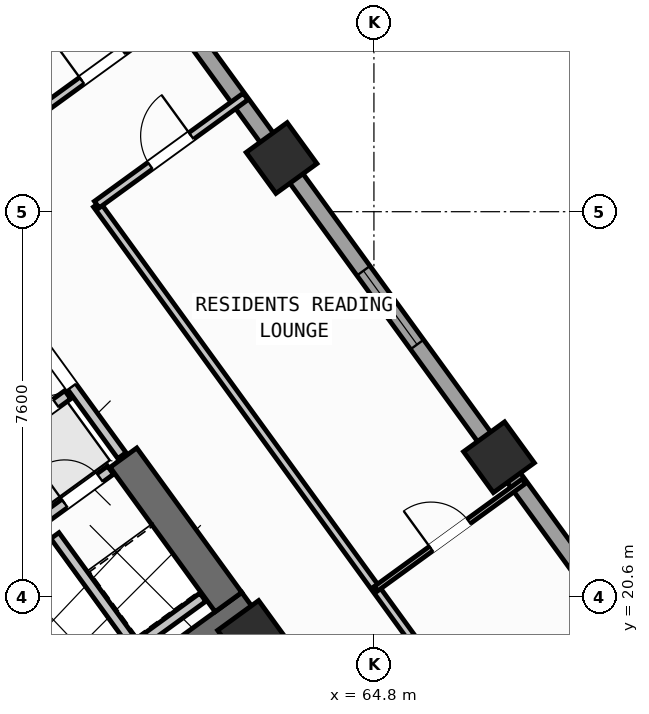
"""IFC4 building model, lengths in metres.
Left out: names, types, materials, properties, quantities, classifications, styles, units other than length and angle.
Written with IfcOpenShell. Run it as: python <this file> out.ifc"""

import sys

from ifc_helpers import new_model, si_unit, direction, frame, frame_2d, origin, origin_2d, place, context, subcontext, project, spatial, rectangle, hollow_rectangle, extrude, source, transform, mapped, element, fill, save


model = new_model("IFC4")
c1 = context("Model", 3, precision=1e-05, world=origin(), true_north=direction((0.0, 1.0)))
c2 = subcontext(c1, "Body", "Model", "MODEL_VIEW")
j1 = project(units=[si_unit("LENGTHUNIT", "METRE"), si_unit("PLANEANGLEUNIT", "RADIAN")], contexts=[c1])
p1 = place(None, origin())
s1 = spatial("IfcSite", under=j1, at=p1, CompositionType="ELEMENT")
p2 = place(p1, origin())
s2 = spatial("IfcBuilding", under=s1, at=p2, CompositionType="ELEMENT")
p3 = place(p2, frame((0.0, 0.0, 34.8)))
s3 = spatial("IfcBuildingStorey", under=s2, at=p3, CompositionType="ELEMENT", Elevation=34.8)
p4 = place(p3, frame((52.318, 13.11, 0.0), z_axis=(0.0, 0.0, 1.0), x_axis=(0.809019445368, 0.587781878776, 0.0)))
e1 = element("IfcWall", 1, at=p4, inside=s3, PredefinedType="SHEAR", context=c2, shape_type="SweptSolid", body=[
    extrude(rectangle(XDim=12.44, YDim=0.65, at=frame_2d((6.22, 0.0))), origin(), (0.0, 0.0, 1.0), 3.35),
])
p5 = place(p3, frame((61.929, 20.494, 0.0), z_axis=(0.0, 0.0, 1.0), x_axis=(-0.58782982593, 0.808984607855, 0.0)))
e2 = element("IfcWall", 2, at=p5, inside=s3, PredefinedType="SHEAR", context=c2, shape_type="SweptSolid", body=[
    extrude(rectangle(XDim=3.525, YDim=0.65, at=frame_2d((1.762, 0.0))), origin(), (0.0, 0.0, 1.0), 3.35),
])
m1 = source(origin(), c2, "Body", "SweptSolid", [
    extrude(hollow_rectangle(XDim=1.0, YDim=1.0, WallThickness=0.04, at=origin_2d()), origin(), (0.0, 0.0, 1.0), 3.6),
])
for number, where, z_axis, x_axis in (
    (3, (62.414, 19.827, 0.0), (0.0, 0.0, 1.0), (0.809, 0.588, 0.0)),
    (4, (67.268, 23.354, 0.0), (0.0, 0.0, 1.0), (0.809, 0.588, 0.0)),
    (5, (62.977, 29.259, 0.0), (0.0, 0.0, 1.0), (0.809, 0.588, 0.0)),
):
    element("IfcColumn", number, at=place(p3, frame(where, z_axis=z_axis, x_axis=x_axis)), inside=s3, PredefinedType="COLUMN", context=c2, shape_type="MappedRepresentation", body=[
        mapped(m1, transform((0.0, 0.0, 0.0), scale=1.0)),
    ])
p6 = place(p3, frame((58.455, 35.484, 0.0), z_axis=(0.0, 0.0, 1.0), x_axis=(0.587783625747, -0.809018176127, 0.0)))
e6 = element("IfcWall", 6, at=p6, inside=s3, PredefinedType="STANDARD", context=c2, shape_type="SweptSolid", body=[
    extrude(rectangle(XDim=21.587, YDim=0.32, at=frame_2d((10.794, 0.0))), origin(), (0.0, 0.0, 1.0), 2.725),
])
p7 = place(p6, frame((1.529, 0.0, 0.85)))
e7 = element("IfcOpeningElement", 7, at=p7, cuts=e6, PredefinedType="OPENING", context=c2, shape_type="SweptSolid", body=[
    extrude(rectangle(XDim=1.8, YDim=1.5, at=frame_2d((0.9, 0.75))), frame((0.0, 0.17, 0.0), z_axis=(0.0, -1.0, 0.0), x_axis=(1.0, 0.0, 0.0)), (0.0, 0.0, 1.0), 0.34),
])
p8 = place(p6, frame((10.444, 0.0, 0.85)))
e8 = element("IfcOpeningElement", 8, at=p8, cuts=e6, PredefinedType="OPENING", context=c2, shape_type="SweptSolid", body=[
    extrude(rectangle(XDim=1.8, YDim=1.5, at=frame_2d((0.9, 0.75))), frame((0.0, 0.17, 0.0), z_axis=(0.0, -1.0, 0.0), x_axis=(1.0, 0.0, 0.0)), (0.0, 0.0, 1.0), 0.34),
])
p9 = place(p6, frame((17.595, 0.0, 0.85)))
e9 = element("IfcOpeningElement", 9, at=p9, cuts=e6, PredefinedType="OPENING", context=c2, shape_type="SweptSolid", body=[
    extrude(rectangle(XDim=1.5, YDim=1.5, at=frame_2d((0.75, 0.75))), frame((0.0, 0.17, 0.0), z_axis=(0.0, -1.0, 0.0), x_axis=(1.0, 0.0, 0.0)), (0.0, 0.0, 1.0), 0.34),
])
p10 = place(p3, frame((58.41, 18.327, 0.0), z_axis=(0.0, 0.0, 1.0), x_axis=(-0.58776738483, 0.809029975545, 0.0)))
e10 = element("IfcWall", 10, at=p10, inside=s3, PredefinedType="SHEAR", context=c2, shape_type="SweptSolid", body=[
    extrude(rectangle(XDim=3.16, YDim=0.26, at=frame_2d((1.58, 0.0))), origin(), (0.0, 0.0, 1.0), 3.35),
])
p11 = place(p3, frame((56.553, 20.884, 0.0), z_axis=(0.0, 0.0, 1.0), x_axis=(0.809035789462, 0.587759382205, 0.0)))
e11 = element("IfcWall", 11, at=p11, inside=s3, PredefinedType="STANDARD", context=c2, shape_type="SweptSolid", body=[
    extrude(rectangle(XDim=3.768, YDim=0.2, at=frame_2d((1.884, 0.0))), origin(), (0.0, 0.0, 1.0), 3.34),
])
p12 = place(p11, frame((2.65, 0.0, 0.0)))
e12 = element("IfcOpeningElement", 12, at=p12, cuts=e11, PredefinedType="OPENING", context=c2, shape_type="SweptSolid", body=[
    extrude(rectangle(XDim=0.86, YDim=2.05, at=frame_2d((0.43, 1.025))), frame((0.0, 0.11, 0.0), z_axis=(0.0, -1.0, 0.0), x_axis=(1.0, 0.0, 0.0)), (0.0, 0.0, 1.0), 0.22),
])
p13 = place(p3, frame((54.421, 21.436, 0.0), z_axis=(0.0, 0.0, 1.0), x_axis=(0.809013710463, 0.587789772183, 0.0)))
e13 = element("IfcWall", 13, at=p13, inside=s3, PredefinedType="STANDARD", context=c2, shape_type="SweptSolid", body=[
    extrude(rectangle(XDim=5.36, YDim=0.2, at=frame_2d((2.68, 0.0))), origin(), (0.0, 0.0, 1.0), 3.34),
])
p14 = place(p13, frame((0.37, 0.0, 0.0)))
e14 = element("IfcOpeningElement", 14, at=p14, cuts=e13, PredefinedType="OPENING", context=c2, shape_type="SweptSolid", body=[
    extrude(rectangle(XDim=1.1, YDim=2.15, at=frame_2d((0.55, 1.075))), frame((0.0, 0.11, 0.0), z_axis=(0.0, -1.0, 0.0), x_axis=(1.0, 0.0, 0.0)), (0.0, 0.0, 1.0), 0.22),
])
p15 = place(p13, frame((2.17, 0.0, 0.0)))
e15 = element("IfcOpeningElement", 15, at=p15, cuts=e13, PredefinedType="OPENING", context=c2, shape_type="SweptSolid", body=[
    extrude(rectangle(XDim=1.1, YDim=2.15, at=frame_2d((0.55, 1.075))), frame((0.0, 0.11, 0.0), z_axis=(0.0, -1.0, 0.0), x_axis=(1.0, 0.0, 0.0)), (0.0, 0.0, 1.0), 0.22),
])
p16 = place(p13, frame((3.97, 0.0, 0.0)))
e16 = element("IfcOpeningElement", 16, at=p16, cuts=e13, PredefinedType="OPENING", context=c2, shape_type="SweptSolid", body=[
    extrude(rectangle(XDim=1.1, YDim=2.15, at=frame_2d((0.55, 1.075))), frame((0.0, 0.11, 0.0), z_axis=(0.0, -1.0, 0.0), x_axis=(1.0, 0.0, 0.0)), (0.0, 0.0, 1.0), 0.22),
])
p17 = place(p3, frame((60.067, 19.655, 0.0), z_axis=(0.0, 0.0, 1.0), x_axis=(-0.587800520745, 0.809005900975, 0.0)))
e17 = element("IfcWall", 17, at=p17, inside=s3, PredefinedType="STANDARD", context=c2, shape_type="SweptSolid", body=[
    extrude(rectangle(XDim=2.66, YDim=0.2, at=frame_2d((1.33, 0.0))), origin(), (0.0, 0.0, 1.0), 3.34),
])
p18 = place(p3, frame((58.472, 18.447, 0.0), z_axis=(0.0, 0.0, 1.0), x_axis=(0.809022487728, 0.587777691266, 0.0)))
e18 = element("IfcWall", 18, at=p18, inside=s3, PredefinedType="STANDARD", context=c2, shape_type="SweptSolid", body=[
    extrude(rectangle(XDim=3.648, YDim=0.2, at=frame_2d((1.824, 0.0))), origin(), (0.0, 0.0, 1.0), 3.34),
])
p19 = place(p3, frame((59.827, 23.386, 0.0), z_axis=(0.0, 0.0, 1.0), x_axis=(-0.587803840107, 0.809003489211, 0.0)))
e19 = element("IfcWall", 19, at=p19, inside=s3, PredefinedType="STANDARD", context=c2, shape_type="SweptSolid", body=[
    extrude(rectangle(XDim=2.96, YDim=0.2, at=frame_2d((1.48, 0.0))), origin(), (0.0, 0.0, 1.0), 3.34),
])
p20 = place(p19, frame((1.68, 0.0, 0.0)))
e20 = element("IfcOpeningElement", 20, at=p20, cuts=e19, PredefinedType="OPENING", context=c2, shape_type="SweptSolid", body=[
    extrude(rectangle(XDim=1.0, YDim=2.1, at=frame_2d((0.5, 1.05))), frame((0.0, 0.11, 0.0), z_axis=(0.0, -1.0, 0.0), x_axis=(1.0, 0.0, 0.0)), (0.0, 0.0, 1.0), 0.22),
])
p21 = place(p3, frame((63.507, 18.322, 0.0), z_axis=(0.0, 0.0, 1.0), x_axis=(0.809034604122, 0.587761013791, 0.0)))
e21 = element("IfcWall", 21, at=p21, inside=s3, PredefinedType="PARTITIONING", context=c2, shape_type="SweptSolid", body=[
    extrude(rectangle(XDim=2.51, YDim=0.16, at=frame_2d((1.255, 0.0))), origin(), (0.0, 0.0, 1.0), 3.34),
])
p22 = place(p3, frame((68.353, 15.922, 0.0), z_axis=(0.0, 0.0, 1.0), x_axis=(-0.587782002009, 0.809019355834, 0.0)))
e22 = element("IfcWall", 22, at=p22, inside=s3, PredefinedType="PARTITIONING", context=c2, shape_type="SweptSolid", body=[
    extrude(rectangle(XDim=15.35, YDim=0.16, at=frame_2d((7.675, 0.0))), origin(), (0.0, 0.0, 1.0), 3.34),
])
p23 = place(p3, frame((59.331, 28.341, 0.0), z_axis=(0.0, 0.0, 1.0), x_axis=(0.809003564202, 0.587803736896, 0.0)))
e23 = element("IfcWall", 23, at=p23, inside=s3, PredefinedType="PARTITIONING", context=c2, shape_type="SweptSolid", body=[
    extrude(rectangle(XDim=3.63, YDim=0.16, at=frame_2d((1.815, 0.0))), origin(), (0.0, 0.0, 1.0), 3.34),
])
p24 = place(p23, frame((1.305, 0.0, 0.0)))
e24 = element("IfcOpeningElement", 24, at=p24, cuts=e23, PredefinedType="OPENING", context=c2, shape_type="SweptSolid", body=[
    extrude(rectangle(XDim=1.0, YDim=2.1, at=frame_2d((0.5, 1.05))), frame((0.0, 0.09, 0.0), z_axis=(0.0, -1.0, 0.0), x_axis=(1.0, 0.0, 0.0)), (0.0, 0.0, 1.0), 0.18),
])
p25 = place(p3, frame((58.067, 30.08, 0.0), z_axis=(0.0, 0.0, 1.0), x_axis=(0.809012309495, 0.587791700422, 0.0)))
e25 = element("IfcWall", 25, at=p25, inside=s3, PredefinedType="PARTITIONING", context=c2, shape_type="SweptSolid", body=[
    extrude(rectangle(XDim=3.63, YDim=0.16, at=frame_2d((1.815, 0.0))), origin(), (0.0, 0.0, 1.0), 3.34),
])
p26 = place(p25, frame((1.2, 0.0, 0.0)))
e26 = element("IfcOpeningElement", 26, at=p26, cuts=e25, PredefinedType="OPENING", context=c2, shape_type="SweptSolid", body=[
    extrude(rectangle(XDim=1.0, YDim=2.1, at=frame_2d((0.5, 1.05))), frame((0.0, 0.09, 0.0), z_axis=(0.0, -1.0, 0.0), x_axis=(1.0, 0.0, 0.0)), (0.0, 0.0, 1.0), 0.18),
])
p27 = place(p3, frame((64.839, 20.759, 0.0), z_axis=(0.0, 0.0, 1.0), x_axis=(0.809013833588, 0.587789602718, 0.0)))
e27 = element("IfcWall", 27, at=p27, inside=s3, PredefinedType="PARTITIONING", context=c2, shape_type="SweptSolid", body=[
    extrude(rectangle(XDim=3.61, YDim=0.11, at=frame_2d((1.805, 0.0))), origin(), (0.0, 0.0, 1.0), 3.34),
])
p28 = place(p27, frame((1.345, 0.0, 0.0)))
e28 = element("IfcOpeningElement", 28, at=p28, cuts=e27, PredefinedType="OPENING", context=c2, shape_type="SweptSolid", body=[
    extrude(rectangle(XDim=0.92, YDim=2.08, at=frame_2d((0.46, 1.04))), frame((0.0, 0.065, 0.0), z_axis=(0.0, -1.0, 0.0), x_axis=(1.0, 0.0, 0.0)), (0.0, 0.0, 1.0), 0.13),
])
m2 = source(origin(), c2, "Body", "SweptSolid", [
    extrude(rectangle(XDim=1.8, YDim=1.5, at=frame_2d((0.9, 0.75))), frame((0.0, 0.03, 0.0), z_axis=(0.0, -1.0, 0.0), x_axis=(1.0, 0.0, 0.0)), (0.0, 0.0, 1.0), 0.06),
])
p29 = place(p8, origin())
e29 = element("IfcWindow", 29, at=p29, inside=s3, PartitioningType="SINGLE_PANEL", PredefinedType="WINDOW", context=c2, shape_type="MappedRepresentation", body=[
    mapped(m2, transform((0.0, 0.0, 0.0), scale=1.0)),
])
fill(e8, e29)
m3 = source(origin(), c2, "Body", "SweptSolid", [
    extrude(rectangle(XDim=1.1, YDim=2.15, at=frame_2d((0.55, 1.075))), frame((0.0, 0.025, 0.0), z_axis=(0.0, -1.0, 0.0), x_axis=(1.0, 0.0, 0.0)), (0.0, 0.0, 1.0), 0.05),
])
p30 = place(p16, origin())
e30 = element("IfcDoor", 30, at=p30, inside=s3, OperationType="DOUBLE_DOOR_SLIDING", PredefinedType="DOOR", context=c2, shape_type="MappedRepresentation", body=[
    mapped(m3, transform((0.0, 0.0, 0.0), scale=1.0)),
])
fill(e16, e30)
m4 = source(origin(), c2, "Body", "SweptSolid", [
    extrude(rectangle(XDim=0.86, YDim=2.05, at=frame_2d((0.43, 1.025))), frame((0.0, 0.025, 0.0), z_axis=(0.0, -1.0, 0.0), x_axis=(1.0, 0.0, 0.0)), (0.0, 0.0, 1.0), 0.05),
])
p31 = place(p12, origin())
e31 = element("IfcDoor", 31, at=p31, inside=s3, OperationType="SINGLE_SWING_LEFT", PredefinedType="DOOR", context=c2, shape_type="MappedRepresentation", body=[
    mapped(m4, transform((0.0, 0.0, 0.0), scale=1.0)),
])
fill(e12, e31)
m5 = source(origin(), c2, "Body", "SweptSolid", [
    extrude(rectangle(XDim=1.0, YDim=2.1, at=frame_2d((0.5, 1.05))), frame((0.0, 0.025, 0.0), z_axis=(0.0, -1.0, 0.0), x_axis=(1.0, 0.0, 0.0)), (0.0, 0.0, 1.0), 0.05),
])
p32 = place(p20, origin())
e32 = element("IfcDoor", 32, at=p32, inside=s3, OperationType="SINGLE_SWING_RIGHT", PredefinedType="DOOR", context=c2, shape_type="MappedRepresentation", body=[
    mapped(m5, transform((0.0, 0.0, 0.0), scale=1.0)),
])
fill(e20, e32)
p33 = place(p26, origin())
e33 = element("IfcDoor", 33, at=p33, inside=s3, OperationType="SINGLE_SWING_LEFT", PredefinedType="DOOR", context=c2, shape_type="MappedRepresentation", body=[
    mapped(m5, transform((0.0, 0.0, 0.0), scale=1.0)),
])
fill(e26, e33)
p34 = place(p24, origin())
e34 = element("IfcDoor", 34, at=p34, inside=s3, OperationType="SINGLE_SWING_RIGHT", PredefinedType="DOOR", context=c2, shape_type="MappedRepresentation", body=[
    mapped(m5, transform((0.0, 0.0, 0.0), scale=1.0)),
])
fill(e24, e34)
m6 = source(origin(), c2, "Body", "SweptSolid", [
    extrude(rectangle(XDim=0.92, YDim=2.08, at=frame_2d((0.46, 1.04))), frame((0.0, 0.025, 0.0), z_axis=(0.0, -1.0, 0.0), x_axis=(1.0, 0.0, 0.0)), (0.0, 0.0, 1.0), 0.05),
])
p35 = place(p28, origin())
e35 = element("IfcDoor", 35, at=p35, inside=s3, OperationType="SINGLE_SWING_LEFT", PredefinedType="DOOR", context=c2, shape_type="MappedRepresentation", body=[
    mapped(m6, transform((0.0, 0.0, 0.0), scale=1.0)),
])
fill(e28, e35)
save(model, sys.argv[1])
